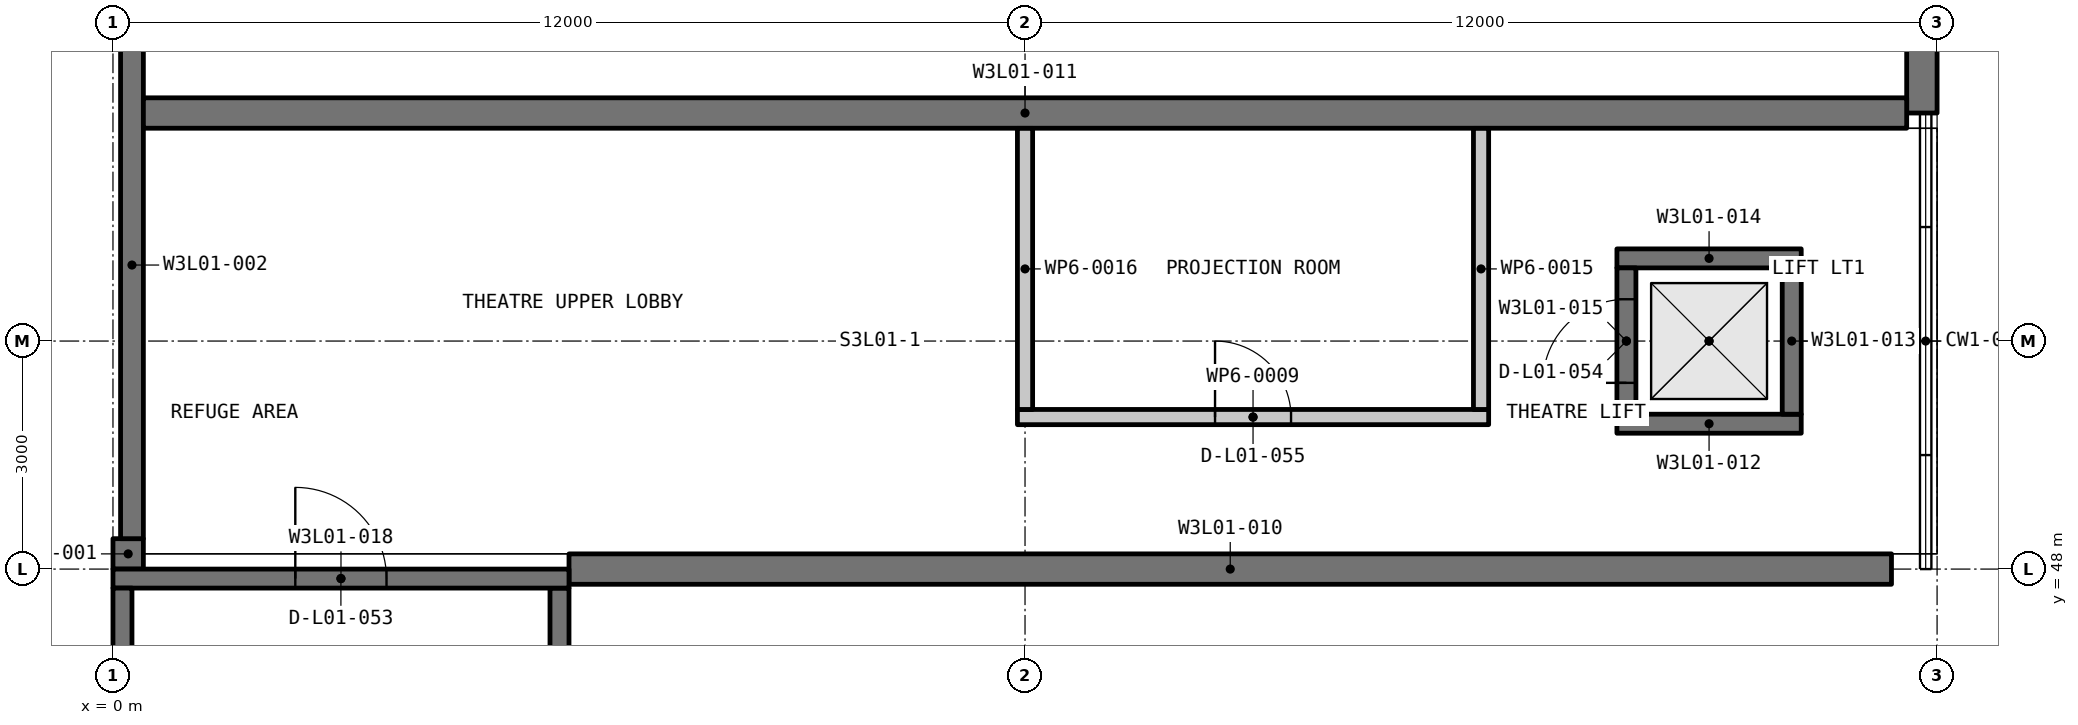
"""IFC4 building model, lengths in metres.
Left out: names, types, materials, properties, quantities, classifications, styles, units other than length and angle.
Written with IfcOpenShell. Run it as: python <this file> out.ifc"""

import sys

from ifc_helpers import new_model, si_unit, direction, frame, frame_2d, origin, place, context, subcontext, project, spatial, rectangle, extrude, element, fill, save


model = new_model("IFC4")
c1 = context("Model", 3, precision=1e-05, world=origin(), true_north=direction((0.0, 1.0)))
c2 = subcontext(c1, "Body", "Model", "MODEL_VIEW")
j1 = project(units=[si_unit("LENGTHUNIT", "METRE"), si_unit("PLANEANGLEUNIT", "RADIAN")], contexts=[c1])
p1 = place(None, origin())
s1 = spatial("IfcSite", under=j1, at=p1, CompositionType="ELEMENT")
p2 = place(p1, origin())
s2 = spatial("IfcBuilding", under=s1, at=p2, CompositionType="ELEMENT")
p3 = place(p2, frame((0.0, 0.0, 6.0)))
s3 = spatial("IfcBuildingStorey", under=s2, at=p3, CompositionType="ELEMENT", Elevation=6.0)
p4 = place(p3, frame((0.2, 48.0, -0.3), z_axis=(0.0, 0.0, 1.0), x_axis=(0.0, 1.0, 0.0)))
e1 = element("IfcWall", 1, at=p4, inside=s3, PredefinedType="SOLIDWALL", context=c2, shape_type="SweptSolid", body=[
    extrude(rectangle(XDim=0.4, YDim=0.4, at=frame_2d((0.2, 0.0))), origin(), (0.0, 0.0, 1.0), 5.25),
])
p5 = place(p3, frame((0.25, 48.4, -0.3), z_axis=(0.0, 0.0, 1.0), x_axis=(0.0, 1.0, 0.0)))
e2 = element("IfcWall", 2, at=p5, inside=s3, PredefinedType="SOLIDWALL", context=c2, shape_type="SweptSolid", body=[
    extrude(rectangle(XDim=7.2, YDim=0.3, at=frame_2d((3.6, 0.0))), origin(), (0.0, 0.0, 1.0), 5.25),
])
p6 = place(p3, frame((23.8, 54.0, -0.3), z_axis=(0.0, 0.0, 1.0), x_axis=(0.0, 1.0, 0.0)))
e3 = element("IfcWall", 3, at=p6, inside=s3, PredefinedType="SOLIDWALL", context=c2, shape_type="SweptSolid", body=[
    extrude(rectangle(XDim=10.0, YDim=0.4, at=frame_2d((5.0, 0.0))), origin(), (0.0, 0.0, 1.0), 5.117),
])
p7 = place(p3, frame((6.0, 48.0, -0.3), z_axis=(0.0, 0.0, 1.0), x_axis=(1.0, 0.0, 0.0)))
e4 = element("IfcWall", 4, at=p7, inside=s3, PredefinedType="SOLIDWALL", context=c2, shape_type="SweptSolid", body=[
    extrude(rectangle(XDim=17.4, YDim=0.4, at=frame_2d((8.7, 0.0))), origin(), (0.0, 0.0, 1.0), 5.25),
])
p8 = place(p3, frame((0.4, 54.0, -0.3), z_axis=(0.0, 0.0, 1.0), x_axis=(1.0, 0.0, 0.0)))
e5 = element("IfcWall", 5, at=p8, inside=s3, PredefinedType="SOLIDWALL", context=c2, shape_type="SweptSolid", body=[
    extrude(rectangle(XDim=23.2, YDim=0.4, at=frame_2d((11.6, 0.0))), origin(), (0.0, 0.0, 1.0), 5.25),
])
p9 = place(p3, frame((19.788, 49.913, -0.3), z_axis=(0.0, 0.0, 1.0), x_axis=(1.0, 0.0, 0.0)))
e6 = element("IfcWall", 6, at=p9, inside=s3, PredefinedType="SHEAR", context=c2, shape_type="SweptSolid", body=[
    extrude(rectangle(XDim=2.425, YDim=0.25, at=frame_2d((1.212, 0.0))), origin(), (0.0, 0.0, 1.0), 4.05),
])
p10 = place(p3, frame((22.087, 50.038, -0.3), z_axis=(0.0, 0.0, 1.0), x_axis=(0.0, 1.0, 0.0)))
e7 = element("IfcWall", 7, at=p10, inside=s3, PredefinedType="SHEAR", context=c2, shape_type="SweptSolid", body=[
    extrude(rectangle(XDim=1.925, YDim=0.25, at=frame_2d((0.962, 0.0))), origin(), (0.0, 0.0, 1.0), 4.05),
])
p11 = place(p3, frame((19.788, 52.087, -0.3), z_axis=(0.0, 0.0, 1.0), x_axis=(1.0, 0.0, 0.0)))
e8 = element("IfcWall", 8, at=p11, inside=s3, PredefinedType="SHEAR", context=c2, shape_type="SweptSolid", body=[
    extrude(rectangle(XDim=2.425, YDim=0.25, at=frame_2d((1.212, 0.0))), origin(), (0.0, 0.0, 1.0), 4.05),
])
p12 = place(p3, frame((19.913, 50.038, -0.3), z_axis=(0.0, 0.0, 1.0), x_axis=(0.0, 1.0, 0.0)))
e9 = element("IfcWall", 9, at=p12, inside=s3, PredefinedType="SHEAR", context=c2, shape_type="SweptSolid", body=[
    extrude(rectangle(XDim=1.925, YDim=0.25, at=frame_2d((0.962, 0.0))), origin(), (0.0, 0.0, 1.0), 4.05),
])
p13 = place(p12, frame((0.413, 0.0, 0.3)))
e10 = element("IfcOpeningElement", 10, at=p13, cuts=e9, PredefinedType="OPENING", context=c2, shape_type="SweptSolid", body=[
    extrude(rectangle(XDim=1.1, YDim=2.1, at=frame_2d((0.55, 1.05))), frame((0.0, 0.135, 0.0), z_axis=(0.0, -1.0, 0.0), x_axis=(1.0, 0.0, 0.0)), (0.0, 0.0, 1.0), 0.27),
])
p14 = place(p3, frame((5.875, 40.25, -0.3), z_axis=(0.0, 0.0, 1.0), x_axis=(0.0, 1.0, 0.0)))
e11 = element("IfcWall", 11, at=p14, inside=s3, PredefinedType="SHEAR", context=c2, shape_type="SweptSolid", body=[
    extrude(rectangle(XDim=7.5, YDim=0.25, at=frame_2d((3.75, 0.0))), origin(), (0.0, 0.0, 1.0), 3.05),
])
p15 = place(p3, frame((0.0, 47.875, -0.3), z_axis=(0.0, 0.0, 1.0), x_axis=(1.0, 0.0, 0.0)))
e12 = element("IfcWall", 12, at=p15, inside=s3, PredefinedType="SHEAR", context=c2, shape_type="SweptSolid", body=[
    extrude(rectangle(XDim=6.0, YDim=0.25, at=frame_2d((3.0, 0.0))), origin(), (0.0, 0.0, 1.0), 3.05),
])
p16 = place(p15, frame((2.399, 0.0, 0.3)))
e13 = element("IfcOpeningElement", 13, at=p16, cuts=e12, PredefinedType="OPENING", context=c2, shape_type="SweptSolid", body=[
    extrude(rectangle(XDim=1.2, YDim=2.2, at=frame_2d((0.6, 1.1))), frame((0.0, 0.135, 0.0), z_axis=(0.0, -1.0, 0.0), x_axis=(1.0, 0.0, 0.0)), (0.0, 0.0, 1.0), 0.27),
])
p17 = place(p3, frame((0.125, 40.25, -0.3), z_axis=(0.0, 0.0, 1.0), x_axis=(0.0, 1.0, 0.0)))
e14 = element("IfcWall", 14, at=p17, inside=s3, PredefinedType="SHEAR", context=c2, shape_type="SweptSolid", body=[
    extrude(rectangle(XDim=7.5, YDim=0.25, at=frame_2d((3.75, 0.0))), origin(), (0.0, 0.0, 1.0), 3.05),
])
p18 = place(p2, origin())
s4 = spatial("IfcBuildingStorey", under=s2, at=p18, CompositionType="ELEMENT", Elevation=0.0)
p19 = place(p18, frame((18.0, 63.998, 0.0), z_axis=(0.0, 0.0, 1.0), x_axis=(0.0, -1.0, 0.0)))
e15 = element("IfcWall", 15, at=p19, inside=s4, PredefinedType="PARTITIONING", context=c2, shape_type="SweptSolid", body=[
    extrude(rectangle(XDim=9.796, YDim=0.2, at=frame_2d((4.898, 0.0))), origin(), (0.0, 0.0, 1.0), 11.05),
])
p20 = place(p19, frame((6.998, 0.0, 0.0)))
e16 = element("IfcOpeningElement", 16, at=p20, cuts=e15, PredefinedType="OPENING", context=c2, shape_type="SweptSolid", body=[
    extrude(rectangle(XDim=1.0, YDim=2.1, at=frame_2d((0.5, 1.05))), frame((0.0, 0.11, 0.0), z_axis=(0.0, -1.0, 0.0), x_axis=(1.0, 0.0, 0.0)), (0.0, 0.0, 1.0), 0.22),
])
p21 = place(p19, frame((1.998, 0.0, 0.0)))
e17 = element("IfcOpeningElement", 17, at=p21, cuts=e15, PredefinedType="OPENING", context=c2, shape_type="SweptSolid", body=[
    extrude(rectangle(XDim=1.0, YDim=2.1, at=frame_2d((0.5, 1.05))), frame((0.0, 0.11, 0.0), z_axis=(0.0, -1.0, 0.0), x_axis=(1.0, 0.0, 0.0)), (0.0, 0.0, 1.0), 0.22),
])
p22 = place(p18, frame((15.0, 71.598, 0.0), z_axis=(0.0, 0.0, 1.0), x_axis=(0.0, -1.0, 0.0)))
e18 = element("IfcWall", 18, at=p22, inside=s4, PredefinedType="PARTITIONING", context=c2, shape_type="SweptSolid", body=[
    extrude(rectangle(XDim=17.396, YDim=0.2, at=frame_2d((8.698, 0.0))), origin(), (0.0, 0.0, 1.0), 12.175),
])
p23 = place(p22, frame((9.723, 0.0, 0.0)))
e19 = element("IfcOpeningElement", 19, at=p23, cuts=e18, PredefinedType="OPENING", context=c2, shape_type="SweptSolid", body=[
    extrude(rectangle(XDim=1.8, YDim=2.1, at=frame_2d((0.9, 1.05))), frame((0.0, 0.11, 0.0), z_axis=(0.0, -1.0, 0.0), x_axis=(1.0, 0.0, 0.0)), (0.0, 0.0, 1.0), 0.22),
])
p24 = place(p22, frame((0.772, 0.0, 0.0)))
e20 = element("IfcOpeningElement", 20, at=p24, cuts=e18, PredefinedType="OPENING", context=c2, shape_type="SweptSolid", body=[
    extrude(rectangle(XDim=1.8, YDim=2.1, at=frame_2d((0.9, 1.05))), frame((0.0, 0.11, 0.0), z_axis=(0.0, -1.0, 0.0), x_axis=(1.0, 0.0, 0.0)), (0.0, 0.0, 1.0), 0.22),
])
p25 = place(p3, frame((11.9, 50.0, 0.0), z_axis=(0.0, 0.0, 1.0), x_axis=(1.0, 0.0, 0.0)))
e21 = element("IfcWall", 21, at=p25, inside=s3, PredefinedType="PARTITIONING", context=c2, shape_type="SweptSolid", body=[
    extrude(rectangle(XDim=6.2, YDim=0.2, at=frame_2d((3.1, 0.0))), origin(), (0.0, 0.0, 1.0), 4.95),
])
p26 = place(p25, frame((2.6, 0.0, 0.0)))
e22 = element("IfcOpeningElement", 22, at=p26, cuts=e21, PredefinedType="OPENING", context=c2, shape_type="SweptSolid", body=[
    extrude(rectangle(XDim=1.0, YDim=2.1, at=frame_2d((0.5, 1.05))), frame((0.0, 0.11, 0.0), z_axis=(0.0, -1.0, 0.0), x_axis=(1.0, 0.0, 0.0)), (0.0, 0.0, 1.0), 0.22),
])
for number, where, z_axis, x_axis in (
    (23, (18.0, 50.1, 0.0), (0.0, 0.0, 1.0), (0.0, 1.0, 0.0)),
    (24, (12.0, 50.1, 0.0), (0.0, 0.0, 1.0), (0.0, 1.0, 0.0)),
):
    element("IfcWall", number, at=place(p3, frame(where, z_axis=z_axis, x_axis=x_axis)), inside=s3, PredefinedType="PARTITIONING", context=c2, shape_type="SweptSolid", body=[
        extrude(rectangle(XDim=3.698, YDim=0.2, at=frame_2d((1.849, 0.0))), origin(), (0.0, 0.0, 1.0), 4.95),
    ])
p27 = place(p16, origin())
e25 = element("IfcDoor", 25, at=p27, inside=s3, OperationType="SINGLE_SWING_LEFT", PredefinedType="DOOR", context=c2, shape_type="SweptSolid", body=[
    extrude(rectangle(XDim=1.2, YDim=2.2, at=frame_2d((0.6, 1.1))), frame((0.0, 0.025, 0.0), z_axis=(0.0, -1.0, 0.0), x_axis=(1.0, 0.0, 0.0)), (0.0, 0.0, 1.0), 0.05),
])
fill(e13, e25)
p28 = place(p13, origin())
e26 = element("IfcDoor", 26, at=p28, inside=s3, OperationType="DOUBLE_DOOR_SLIDING", PredefinedType="DOOR", context=c2, shape_type="SweptSolid", body=[
    extrude(rectangle(XDim=1.1, YDim=2.1, at=frame_2d((0.55, 1.05))), frame((0.0, 0.025, 0.0), z_axis=(0.0, -1.0, 0.0), x_axis=(1.0, 0.0, 0.0)), (0.0, 0.0, 1.0), 0.05),
])
fill(e10, e26)
p29 = place(p26, origin())
e27 = element("IfcDoor", 27, at=p29, inside=s3, OperationType="SINGLE_SWING_RIGHT", PredefinedType="DOOR", context=c2, shape_type="SweptSolid", body=[
    extrude(rectangle(XDim=1.0, YDim=2.1, at=frame_2d((0.5, 1.05))), frame((0.0, 0.025, 0.0), z_axis=(0.0, -1.0, 0.0), x_axis=(1.0, 0.0, 0.0)), (0.0, 0.0, 1.0), 0.05),
])
fill(e22, e27)
save(model, sys.argv[1])
